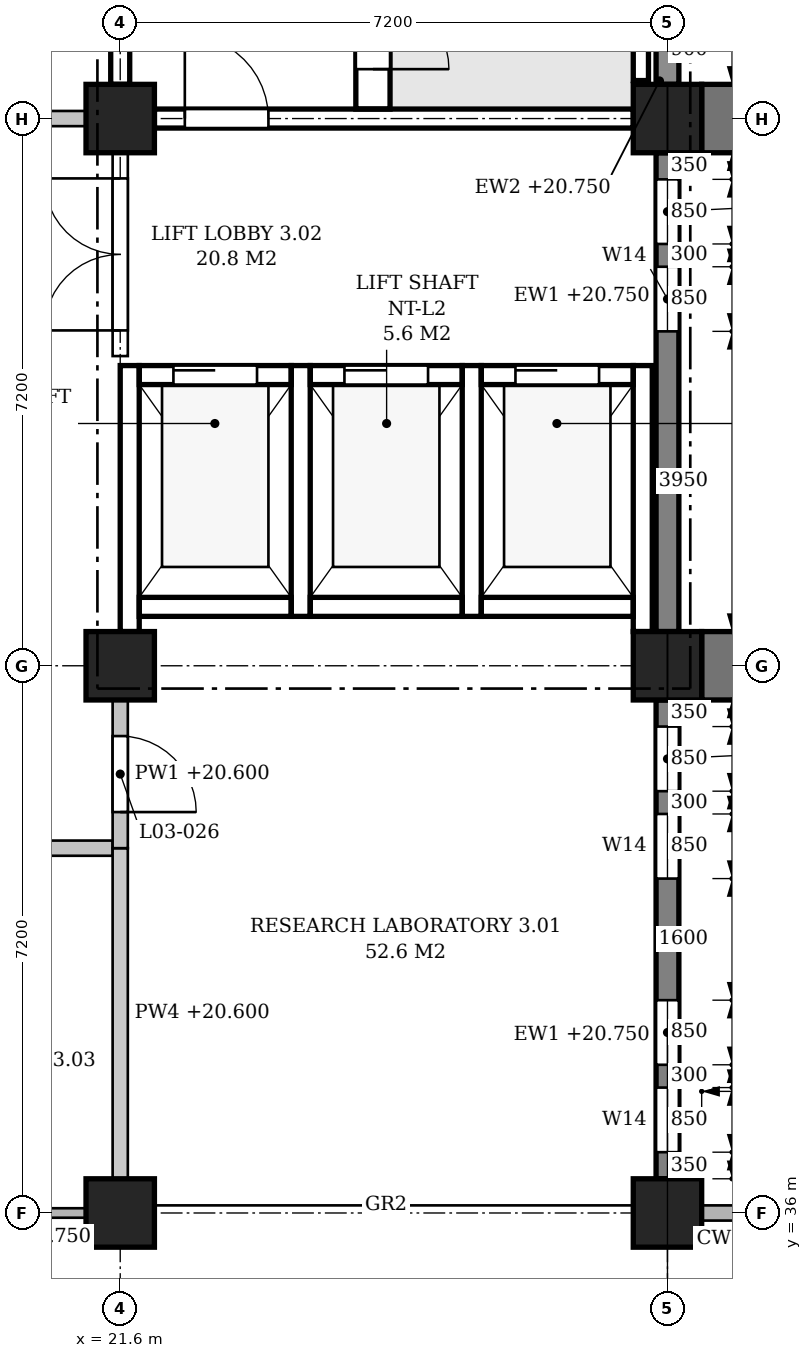
"""IFC4 building model, lengths in metres.
Left out: names, types, materials, properties, quantities, classifications, styles, units other than length and angle.
Written with IfcOpenShell. Run it as: python <this file> out.ifc"""

import sys

from ifc_helpers import new_model, si_unit, direction, frame, frame_2d, origin, origin_2d, place, context, subcontext, project, spatial, polyline, rectangle, outline, extrude, element, fill, save


model = new_model("IFC4")
c1 = context("Model", 3, precision=1e-05, world=origin(), true_north=direction((0.0, 1.0)))
c2 = subcontext(c1, "Body", "Model", "MODEL_VIEW")
j1 = project(units=[si_unit("LENGTHUNIT", "METRE"), si_unit("PLANEANGLEUNIT", "RADIAN")], contexts=[c1])
p1 = place(None, origin())
s1 = spatial("IfcSite", under=j1, at=p1, CompositionType="ELEMENT")
p2 = place(p1, origin())
s2 = spatial("IfcBuilding", under=s1, at=p2, CompositionType="ELEMENT")
p3 = place(p2, frame((0.0, 0.0, 16.8)))
s3 = spatial("IfcBuildingStorey", under=s2, at=p3, CompositionType="ELEMENT", Elevation=16.8)
for number, where, z_axis, x_axis in (
    (1, (21.6, 36.0, 0.0), (0.0, 0.0, 1.0), (1.0, 0.0, 0.0)),
    (2, (21.6, 43.2, 0.0), (0.0, 0.0, 1.0), (1.0, 0.0, 0.0)),
    (3, (21.6, 50.4, 0.0), (0.0, 0.0, 1.0), (1.0, 0.0, 0.0)),
    (4, (28.8, 36.0, 0.0), (0.0, 0.0, 1.0), (1.0, 0.0, 0.0)),
    (5, (28.8, 43.2, 0.0), (0.0, 0.0, 1.0), (1.0, 0.0, 0.0)),
    (6, (28.8, 50.4, 0.0), (0.0, 0.0, 1.0), (1.0, 0.0, 0.0)),
):
    element("IfcColumn", number, at=place(p3, frame(where, z_axis=z_axis, x_axis=x_axis)), inside=s3, PredefinedType="COLUMN", context=c2, shape_type="SweptSolid", body=[
        extrude(rectangle(XDim=0.9, YDim=0.9, at=origin_2d()), origin(), (0.0, 0.0, 1.0), 4.8),
    ])
p4 = place(p3, frame((28.8, 36.45, 0.0), z_axis=(0.0, 0.0, 1.0), x_axis=(0.0, 1.0, 0.0)))
e7 = element("IfcWall", 7, at=p4, inside=s3, PredefinedType="STANDARD", context=c2, shape_type="SweptSolid", body=[
    extrude(rectangle(XDim=6.3, YDim=0.3, at=frame_2d((3.15, 0.0))), origin(), (0.0, 0.0, 1.0), 3.95),
])
p5 = place(p4, frame((0.35, 0.0, 0.9)))
e8 = element("IfcOpeningElement", 8, at=p5, cuts=e7, PredefinedType="OPENING", context=c2, shape_type="SweptSolid", body=[
    extrude(outline(polyline([(0.0, 0.0), (0.85, 0.0), (0.85, 2.05), (0.425, 2.5), (0.0, 2.05), (0.0, 0.0)])), frame((0.0, 0.16, 0.0), z_axis=(0.0, -1.0, 0.0), x_axis=(1.0, 0.0, 0.0)), (0.0, 0.0, 1.0), 0.32),
])
p6 = place(p4, frame((1.5, 0.0, 0.9)))
e9 = element("IfcOpeningElement", 9, at=p6, cuts=e7, PredefinedType="OPENING", context=c2, shape_type="SweptSolid", body=[
    extrude(outline(polyline([(0.0, 0.0), (0.85, 0.0), (0.85, 2.05), (0.425, 2.5), (0.0, 2.05), (0.0, 0.0)])), frame((0.0, 0.16, 0.0), z_axis=(0.0, -1.0, 0.0), x_axis=(1.0, 0.0, 0.0)), (0.0, 0.0, 1.0), 0.32),
])
p7 = place(p4, frame((3.95, 0.0, 0.9)))
e10 = element("IfcOpeningElement", 10, at=p7, cuts=e7, PredefinedType="OPENING", context=c2, shape_type="SweptSolid", body=[
    extrude(outline(polyline([(0.0, 0.0), (0.85, 0.0), (0.85, 2.05), (0.425, 2.5), (0.0, 2.05), (0.0, 0.0)])), frame((0.0, 0.16, 0.0), z_axis=(0.0, -1.0, 0.0), x_axis=(1.0, 0.0, 0.0)), (0.0, 0.0, 1.0), 0.32),
])
p8 = place(p4, frame((5.1, 0.0, 0.9)))
e11 = element("IfcOpeningElement", 11, at=p8, cuts=e7, PredefinedType="OPENING", context=c2, shape_type="SweptSolid", body=[
    extrude(outline(polyline([(0.0, 0.0), (0.85, 0.0), (0.85, 2.05), (0.425, 2.5), (0.0, 2.05), (0.0, 0.0)])), frame((0.0, 0.16, 0.0), z_axis=(0.0, -1.0, 0.0), x_axis=(1.0, 0.0, 0.0)), (0.0, 0.0, 1.0), 0.32),
])
p9 = place(p3, frame((28.8, 43.65, 0.0), z_axis=(0.0, 0.0, 1.0), x_axis=(0.0, 1.0, 0.0)))
e12 = element("IfcWall", 12, at=p9, inside=s3, PredefinedType="STANDARD", context=c2, shape_type="SweptSolid", body=[
    extrude(rectangle(XDim=6.3, YDim=0.3, at=frame_2d((3.15, 0.0))), origin(), (0.0, 0.0, 1.0), 3.95),
])
p10 = place(p9, frame((3.95, 0.0, 0.9)))
e13 = element("IfcOpeningElement", 13, at=p10, cuts=e12, PredefinedType="OPENING", context=c2, shape_type="SweptSolid", body=[
    extrude(outline(polyline([(0.0, 0.0), (0.85, 0.0), (0.85, 2.05), (0.425, 2.5), (0.0, 2.05), (0.0, 0.0)])), frame((0.0, 0.16, 0.0), z_axis=(0.0, -1.0, 0.0), x_axis=(1.0, 0.0, 0.0)), (0.0, 0.0, 1.0), 0.32),
])
p11 = place(p9, frame((5.1, 0.0, 0.9)))
e14 = element("IfcOpeningElement", 14, at=p11, cuts=e12, PredefinedType="OPENING", context=c2, shape_type="SweptSolid", body=[
    extrude(outline(polyline([(0.0, 0.0), (0.85, 0.0), (0.85, 2.05), (0.425, 2.5), (0.0, 2.05), (0.0, 0.0)])), frame((0.0, 0.16, 0.0), z_axis=(0.0, -1.0, 0.0), x_axis=(1.0, 0.0, 0.0)), (0.0, 0.0, 1.0), 0.32),
])
p12 = place(p3, frame((28.8, 50.85, 0.0), z_axis=(0.0, 0.0, 1.0), x_axis=(0.0, 1.0, 0.0)))
e15 = element("IfcWall", 15, at=p12, inside=s3, PredefinedType="STANDARD", context=c2, shape_type="SweptSolid", body=[
    extrude(rectangle(XDim=6.3, YDim=0.3, at=frame_2d((3.15, 0.0))), origin(), (0.0, 0.0, 1.0), 3.95),
])
p13 = place(p12, frame((0.9, 0.0, 0.9)))
e16 = element("IfcOpeningElement", 16, at=p13, cuts=e15, PredefinedType="OPENING", context=c2, shape_type="SweptSolid", body=[
    extrude(outline(polyline([(0.0, 0.0), (0.9, 0.0), (0.9, 2.05), (0.45, 2.5), (0.0, 2.05), (0.0, 0.0)])), frame((0.0, 0.16, 0.0), z_axis=(0.0, -1.0, 0.0), x_axis=(1.0, 0.0, 0.0)), (0.0, 0.0, 1.0), 0.32),
])
p14 = place(p12, frame((4.5, 0.0, 0.9)))
e17 = element("IfcOpeningElement", 17, at=p14, cuts=e15, PredefinedType="OPENING", context=c2, shape_type="SweptSolid", body=[
    extrude(outline(polyline([(0.0, 0.0), (0.9, 0.0), (0.9, 2.05), (0.45, 2.5), (0.0, 2.05), (0.0, 0.0)])), frame((0.0, 0.16, 0.0), z_axis=(0.0, -1.0, 0.0), x_axis=(1.0, 0.0, 0.0)), (0.0, 0.0, 1.0), 0.32),
])
for number, where, z_axis, x_axis in (
    (18, (29.25, 43.2, 0.0), (0.0, 0.0, 1.0), (1.0, 0.0, 0.0)),
    (19, (29.25, 50.4, 0.0), (0.0, 0.0, 1.0), (1.0, 0.0, 0.0)),
):
    element("IfcWall", number, at=place(p3, frame(where, z_axis=z_axis, x_axis=x_axis)), inside=s3, PredefinedType="POLYGONAL", context=c2, shape_type="SweptSolid", body=[
        extrude(outline(polyline([(1.1, 0.0), (1.1, 4.55), (0.0, 4.55), (0.0, 0.0), (1.1, 0.0)])), frame((0.0, 0.45, 0.0), z_axis=(0.0, -1.0, 0.0), x_axis=(1.0, 0.0, 0.0)), (0.0, 0.0, 1.0), 0.9),
    ])
p15 = place(p3, frame((22.05, 50.4, 0.0), z_axis=(0.0, 0.0, 1.0), x_axis=(1.0, 0.0, 0.0)))
e20 = element("IfcWall", 20, at=p15, inside=s3, PredefinedType="SHEAR", context=c2, shape_type="SweptSolid", body=[
    extrude(rectangle(XDim=6.3, YDim=0.25, at=frame_2d((3.15, 0.0))), origin(), (0.0, 0.0, 1.0), 3.8),
])
p16 = place(p15, frame((0.4, 0.0, 0.0)))
e21 = element("IfcOpeningElement", 21, at=p16, cuts=e20, PredefinedType="OPENING", context=c2, shape_type="SweptSolid", body=[
    extrude(rectangle(XDim=1.1, YDim=2.1, at=frame_2d((0.55, 1.05))), frame((0.0, 0.135, 0.0), z_axis=(0.0, -1.0, 0.0), x_axis=(1.0, 0.0, 0.0)), (0.0, 0.0, 1.0), 0.27),
])
p17 = place(p3, frame((21.6, 50.85, 0.0), z_axis=(0.0, 0.0, 1.0), x_axis=(0.0, 1.0, 0.0)))
e22 = element("IfcWall", 22, at=p17, inside=s3, PredefinedType="SHEAR", context=c2, shape_type="SweptSolid", body=[
    extrude(rectangle(XDim=6.3, YDim=0.25, at=frame_2d((3.15, 0.0))), origin(), (0.0, 0.0, 1.0), 3.8),
])
p18 = place(p3, frame((28.45, 50.9, -0.25), z_axis=(0.0, 0.0, 1.0), x_axis=(0.0, 1.0, 0.0)))
e23 = element("IfcWall", 23, at=p18, inside=s3, PredefinedType="SHEAR", context=c2, shape_type="SweptSolid", body=[
    extrude(rectangle(XDim=0.85, YDim=0.2, at=frame_2d((0.425, 0.0))), origin(), (0.0, 0.0, 1.0), 4.8),
])
p19 = place(p3, frame((24.925, 50.525, 0.0), z_axis=(0.0, 0.0, 1.0), x_axis=(0.0, 1.0, 0.0)))
e24 = element("IfcWall", 24, at=p19, inside=s3, PredefinedType="SHEAR", context=c2, shape_type="SweptSolid", body=[
    extrude(rectangle(XDim=6.85, YDim=0.45, at=frame_2d((3.425, 0.0))), origin(), (0.0, 0.0, 1.0), 4.55),
])
p20 = place(p19, frame((0.525, 0.0, 0.0)))
e25 = element("IfcOpeningElement", 25, at=p20, cuts=e24, PredefinedType="OPENING", context=c2, shape_type="SweptSolid", body=[
    extrude(rectangle(XDim=1.0, YDim=2.1, at=frame_2d((0.5, 1.05))), frame((0.0, 0.235, 0.0), z_axis=(0.0, -1.0, 0.0), x_axis=(1.0, 0.0, 0.0)), (0.0, 0.0, 1.0), 0.47),
])
p21 = place(p3, frame((21.725, 43.65, -0.25), z_axis=(0.0, 0.0, 1.0), x_axis=(0.0, 1.0, 0.0)))
e26 = element("IfcWall", 26, at=p21, inside=s3, PredefinedType="SHEAR", context=c2, shape_type="SweptSolid", body=[
    extrude(rectangle(XDim=3.5, YDim=0.25, at=frame_2d((1.75, 0.0))), origin(), (0.0, 0.0, 1.0), 4.05),
])
for number, where, z_axis, x_axis in (
    (27, (23.975, 43.85, -0.25), (0.0, 0.0, 1.0), (0.0, 1.0, 0.0)),
    (28, (26.225, 43.85, -0.25), (0.0, 0.0, 1.0), (0.0, 1.0, 0.0)),
):
    element("IfcWall", number, at=place(p3, frame(where, z_axis=z_axis, x_axis=x_axis)), inside=s3, PredefinedType="SHEAR", context=c2, shape_type="SweptSolid", body=[
        extrude(rectangle(XDim=3.3, YDim=0.25, at=frame_2d((1.65, 0.0))), origin(), (0.0, 0.0, 1.0), 4.8),
    ])
p22 = place(p3, frame((28.475, 43.65, -0.25), z_axis=(0.0, 0.0, 1.0), x_axis=(0.0, 1.0, 0.0)))
e29 = element("IfcWall", 29, at=p22, inside=s3, PredefinedType="SHEAR", context=c2, shape_type="SweptSolid", body=[
    extrude(rectangle(XDim=3.5, YDim=0.25, at=frame_2d((1.75, 0.0))), origin(), (0.0, 0.0, 1.0), 4.8),
])
p23 = place(p3, frame((21.85, 47.025, -0.25), z_axis=(0.0, 0.0, 1.0), x_axis=(1.0, 0.0, 0.0)))
e30 = element("IfcWall", 30, at=p23, inside=s3, PredefinedType="SHEAR", context=c2, shape_type="SweptSolid", body=[
    extrude(rectangle(XDim=2.0, YDim=0.25, at=frame_2d((1.0, 0.0))), origin(), (0.0, 0.0, 1.0), 4.8),
])
p24 = place(p23, frame((0.45, 0.0, 0.25)))
e31 = element("IfcOpeningElement", 31, at=p24, cuts=e30, PredefinedType="OPENING", context=c2, shape_type="SweptSolid", body=[
    extrude(rectangle(XDim=1.1, YDim=2.1, at=frame_2d((0.55, 1.05))), frame((0.0, 0.135, 0.0), z_axis=(0.0, -1.0, 0.0), x_axis=(1.0, 0.0, 0.0)), (0.0, 0.0, 1.0), 0.27),
])
p25 = place(p3, frame((21.85, 43.975, -0.25), z_axis=(0.0, 0.0, 1.0), x_axis=(1.0, 0.0, 0.0)))
e32 = element("IfcWall", 32, at=p25, inside=s3, PredefinedType="SHEAR", context=c2, shape_type="SweptSolid", body=[
    extrude(rectangle(XDim=2.0, YDim=0.25, at=frame_2d((1.0, 0.0))), origin(), (0.0, 0.0, 1.0), 4.8),
])
p26 = place(p3, frame((24.1, 47.025, -0.25), z_axis=(0.0, 0.0, 1.0), x_axis=(1.0, 0.0, 0.0)))
e33 = element("IfcWall", 33, at=p26, inside=s3, PredefinedType="SHEAR", context=c2, shape_type="SweptSolid", body=[
    extrude(rectangle(XDim=2.0, YDim=0.25, at=frame_2d((1.0, 0.0))), origin(), (0.0, 0.0, 1.0), 4.8),
])
p27 = place(p26, frame((0.45, 0.0, 0.25)))
e34 = element("IfcOpeningElement", 34, at=p27, cuts=e33, PredefinedType="OPENING", context=c2, shape_type="SweptSolid", body=[
    extrude(rectangle(XDim=1.1, YDim=2.1, at=frame_2d((0.55, 1.05))), frame((0.0, 0.135, 0.0), z_axis=(0.0, -1.0, 0.0), x_axis=(1.0, 0.0, 0.0)), (0.0, 0.0, 1.0), 0.27),
])
p28 = place(p3, frame((24.1, 43.975, -0.25), z_axis=(0.0, 0.0, 1.0), x_axis=(1.0, 0.0, 0.0)))
e35 = element("IfcWall", 35, at=p28, inside=s3, PredefinedType="SHEAR", context=c2, shape_type="SweptSolid", body=[
    extrude(rectangle(XDim=2.0, YDim=0.25, at=frame_2d((1.0, 0.0))), origin(), (0.0, 0.0, 1.0), 4.8),
])
p29 = place(p3, frame((26.35, 47.025, -0.25), z_axis=(0.0, 0.0, 1.0), x_axis=(1.0, 0.0, 0.0)))
e36 = element("IfcWall", 36, at=p29, inside=s3, PredefinedType="SHEAR", context=c2, shape_type="SweptSolid", body=[
    extrude(rectangle(XDim=2.0, YDim=0.25, at=frame_2d((1.0, 0.0))), origin(), (0.0, 0.0, 1.0), 4.8),
])
p30 = place(p29, frame((0.45, 0.0, 0.25)))
e37 = element("IfcOpeningElement", 37, at=p30, cuts=e36, PredefinedType="OPENING", context=c2, shape_type="SweptSolid", body=[
    extrude(rectangle(XDim=1.1, YDim=2.1, at=frame_2d((0.55, 1.05))), frame((0.0, 0.135, 0.0), z_axis=(0.0, -1.0, 0.0), x_axis=(1.0, 0.0, 0.0)), (0.0, 0.0, 1.0), 0.27),
])
p31 = place(p3, frame((26.35, 43.975, -0.25), z_axis=(0.0, 0.0, 1.0), x_axis=(1.0, 0.0, 0.0)))
e38 = element("IfcWall", 38, at=p31, inside=s3, PredefinedType="SHEAR", context=c2, shape_type="SweptSolid", body=[
    extrude(rectangle(XDim=2.0, YDim=0.25, at=frame_2d((1.0, 0.0))), origin(), (0.0, 0.0, 1.0), 4.8),
])
p32 = place(p3, frame((18.1, 40.8, 0.0), z_axis=(0.0, 0.0, 1.0), x_axis=(1.0, 0.0, 0.0)))
e39 = element("IfcWall", 39, at=p32, inside=s3, PredefinedType="PARTITIONING", context=c2, shape_type="SweptSolid", body=[
    extrude(outline(polyline([(0.0, 0.0), (3.4, 0.0), (3.4, 3.8), (3.25, 3.8), (3.25, 4.55), (0.0, 4.55), (0.0, 0.0)])), frame((0.0, 0.1, 0.0), z_axis=(0.0, -1.0, 0.0), x_axis=(1.0, 0.0, 0.0)), (0.0, 0.0, 1.0), 0.2),
])
p33 = place(p32, frame((1.2, 0.0, 0.0)))
e40 = element("IfcOpeningElement", 40, at=p33, cuts=e39, PredefinedType="OPENING", context=c2, shape_type="SweptSolid", body=[
    extrude(rectangle(XDim=1.0, YDim=2.1, at=frame_2d((0.5, 1.05))), frame((0.0, 0.11, 0.0), z_axis=(0.0, -1.0, 0.0), x_axis=(1.0, 0.0, 0.0)), (0.0, 0.0, 1.0), 0.22),
])
p34 = place(p3, frame((14.85, 50.4, 0.0), z_axis=(0.0, 0.0, 1.0), x_axis=(1.0, 0.0, 0.0)))
e41 = element("IfcWall", 41, at=p34, inside=s3, PredefinedType="PARTITIONING", context=c2, shape_type="SweptSolid", body=[
    extrude(rectangle(XDim=6.3, YDim=0.2, at=frame_2d((3.15, 0.0))), origin(), (0.0, 0.0, 1.0), 3.8),
])
p35 = place(p34, frame((4.225, 0.0, 0.0)))
e42 = element("IfcOpeningElement", 42, at=p35, cuts=e41, PredefinedType="OPENING", context=c2, shape_type="SweptSolid", body=[
    extrude(rectangle(XDim=1.0, YDim=2.1, at=frame_2d((0.5, 1.05))), frame((0.0, 0.11, 0.0), z_axis=(0.0, -1.0, 0.0), x_axis=(1.0, 0.0, 0.0)), (0.0, 0.0, 1.0), 0.22),
])
p36 = place(p3, frame((21.6, 36.45, 0.0), z_axis=(0.0, 0.0, 1.0), x_axis=(0.0, 1.0, 0.0)))
e43 = element("IfcWall", 43, at=p36, inside=s3, PredefinedType="PARTITIONING", context=c2, shape_type="SweptSolid", body=[
    extrude(rectangle(XDim=4.35, YDim=0.2, at=frame_2d((2.175, 0.0))), origin(), (0.0, 0.0, 1.0), 3.8),
])
p37 = place(p3, frame((21.6, 40.8, 0.0), z_axis=(0.0, 0.0, 1.0), x_axis=(0.0, 1.0, 0.0)))
e44 = element("IfcWall", 44, at=p37, inside=s3, PredefinedType="PARTITIONING", context=c2, shape_type="SweptSolid", body=[
    extrude(rectangle(XDim=1.95, YDim=0.2, at=frame_2d((0.975, 0.0))), origin(), (0.0, 0.0, 1.0), 3.8),
])
p38 = place(p37, frame((0.475, 0.0, 0.0)))
e45 = element("IfcOpeningElement", 45, at=p38, cuts=e44, PredefinedType="OPENING", context=c2, shape_type="SweptSolid", body=[
    extrude(rectangle(XDim=1.0, YDim=2.1, at=frame_2d((0.5, 1.05))), frame((0.0, 0.11, 0.0), z_axis=(0.0, -1.0, 0.0), x_axis=(1.0, 0.0, 0.0)), (0.0, 0.0, 1.0), 0.22),
])
p39 = place(p3, frame((21.6, 47.275, 0.0), z_axis=(0.0, 0.0, 1.0), x_axis=(0.0, 1.0, 0.0)))
e46 = element("IfcWall", 46, at=p39, inside=s3, PredefinedType="PARTITIONING", context=c2, shape_type="SweptSolid", body=[
    extrude(rectangle(XDim=2.675, YDim=0.2, at=frame_2d((1.337, 0.0))), origin(), (0.0, 0.0, 1.0), 3.8),
])
p40 = place(p39, frame((0.337, 0.0, 0.0)))
e47 = element("IfcOpeningElement", 47, at=p40, cuts=e46, PredefinedType="OPENING", context=c2, shape_type="SweptSolid", body=[
    extrude(rectangle(XDim=2.0, YDim=2.4, at=frame_2d((1.0, 1.2))), frame((0.0, 0.11, 0.0), z_axis=(0.0, -1.0, 0.0), x_axis=(1.0, 0.0, 0.0)), (0.0, 0.0, 1.0), 0.22),
])
p41 = place(p5, origin())
e48 = element("IfcWindow", 48, at=p41, inside=s3, PartitioningType="SINGLE_PANEL", PredefinedType="WINDOW", context=c2, shape_type="SweptSolid", body=[
    extrude(outline(polyline([(0.0, 0.0), (0.85, 0.0), (0.85, 2.05), (0.425, 2.5), (0.0, 2.05), (0.0, 0.0)])), frame((0.0, 0.03, 0.0), z_axis=(0.0, -1.0, 0.0), x_axis=(1.0, 0.0, 0.0)), (0.0, 0.0, 1.0), 0.06),
])
fill(e8, e48)
p42 = place(p6, origin())
e49 = element("IfcWindow", 49, at=p42, inside=s3, PartitioningType="SINGLE_PANEL", PredefinedType="WINDOW", context=c2, shape_type="SweptSolid", body=[
    extrude(outline(polyline([(0.0, 0.0), (0.85, 0.0), (0.85, 2.05), (0.425, 2.5), (0.0, 2.05), (0.0, 0.0)])), frame((0.0, 0.03, 0.0), z_axis=(0.0, -1.0, 0.0), x_axis=(1.0, 0.0, 0.0)), (0.0, 0.0, 1.0), 0.06),
])
fill(e9, e49)
p43 = place(p7, origin())
e50 = element("IfcWindow", 50, at=p43, inside=s3, PartitioningType="SINGLE_PANEL", PredefinedType="WINDOW", context=c2, shape_type="SweptSolid", body=[
    extrude(outline(polyline([(0.0, 0.0), (0.85, 0.0), (0.85, 2.05), (0.425, 2.5), (0.0, 2.05), (0.0, 0.0)])), frame((0.0, 0.03, 0.0), z_axis=(0.0, -1.0, 0.0), x_axis=(1.0, 0.0, 0.0)), (0.0, 0.0, 1.0), 0.06),
])
fill(e10, e50)
p44 = place(p8, origin())
e51 = element("IfcWindow", 51, at=p44, inside=s3, PartitioningType="SINGLE_PANEL", PredefinedType="WINDOW", context=c2, shape_type="SweptSolid", body=[
    extrude(outline(polyline([(0.0, 0.0), (0.85, 0.0), (0.85, 2.05), (0.425, 2.5), (0.0, 2.05), (0.0, 0.0)])), frame((0.0, 0.03, 0.0), z_axis=(0.0, -1.0, 0.0), x_axis=(1.0, 0.0, 0.0)), (0.0, 0.0, 1.0), 0.06),
])
fill(e11, e51)
p45 = place(p10, origin())
e52 = element("IfcWindow", 52, at=p45, inside=s3, PartitioningType="SINGLE_PANEL", PredefinedType="WINDOW", context=c2, shape_type="SweptSolid", body=[
    extrude(outline(polyline([(0.0, 0.0), (0.85, 0.0), (0.85, 2.05), (0.425, 2.5), (0.0, 2.05), (0.0, 0.0)])), frame((0.0, 0.03, 0.0), z_axis=(0.0, -1.0, 0.0), x_axis=(1.0, 0.0, 0.0)), (0.0, 0.0, 1.0), 0.06),
])
fill(e13, e52)
p46 = place(p11, origin())
e53 = element("IfcWindow", 53, at=p46, inside=s3, PartitioningType="SINGLE_PANEL", PredefinedType="WINDOW", context=c2, shape_type="SweptSolid", body=[
    extrude(outline(polyline([(0.0, 0.0), (0.85, 0.0), (0.85, 2.05), (0.425, 2.5), (0.0, 2.05), (0.0, 0.0)])), frame((0.0, 0.03, 0.0), z_axis=(0.0, -1.0, 0.0), x_axis=(1.0, 0.0, 0.0)), (0.0, 0.0, 1.0), 0.06),
])
fill(e14, e53)
p47 = place(p20, frame((1.0, 0.0, 0.0), z_axis=(0.0, 0.0, 1.0), x_axis=(-1.0, 0.0, 0.0)))
e54 = element("IfcDoor", 54, at=p47, inside=s3, OperationType="SINGLE_SWING_RIGHT", PredefinedType="DOOR", context=c2, shape_type="SweptSolid", body=[
    extrude(rectangle(XDim=1.0, YDim=2.1, at=frame_2d((0.5, 1.05))), frame((0.0, 0.025, 0.0), z_axis=(0.0, -1.0, 0.0), x_axis=(1.0, 0.0, 0.0)), (0.0, 0.0, 1.0), 0.05),
])
fill(e25, e54)
p48 = place(p16, origin())
e55 = element("IfcDoor", 55, at=p48, inside=s3, OperationType="SINGLE_SWING_LEFT", PredefinedType="DOOR", context=c2, shape_type="SweptSolid", body=[
    extrude(rectangle(XDim=1.1, YDim=2.1, at=frame_2d((0.55, 1.05))), frame((0.0, 0.025, 0.0), z_axis=(0.0, -1.0, 0.0), x_axis=(1.0, 0.0, 0.0)), (0.0, 0.0, 1.0), 0.05),
])
fill(e21, e55)
p49 = place(p24, origin())
e56 = element("IfcDoor", 56, at=p49, inside=s3, OperationType="SLIDING_TO_LEFT", PredefinedType="DOOR", context=c2, shape_type="SweptSolid", body=[
    extrude(rectangle(XDim=1.1, YDim=2.1, at=frame_2d((0.55, 1.05))), frame((0.0, 0.025, 0.0), z_axis=(0.0, -1.0, 0.0), x_axis=(1.0, 0.0, 0.0)), (0.0, 0.0, 1.0), 0.05),
])
fill(e31, e56)
p50 = place(p27, origin())
e57 = element("IfcDoor", 57, at=p50, inside=s3, OperationType="SLIDING_TO_LEFT", PredefinedType="DOOR", context=c2, shape_type="SweptSolid", body=[
    extrude(rectangle(XDim=1.1, YDim=2.1, at=frame_2d((0.55, 1.05))), frame((0.0, 0.025, 0.0), z_axis=(0.0, -1.0, 0.0), x_axis=(1.0, 0.0, 0.0)), (0.0, 0.0, 1.0), 0.05),
])
fill(e34, e57)
p51 = place(p30, origin())
e58 = element("IfcDoor", 58, at=p51, inside=s3, OperationType="SLIDING_TO_LEFT", PredefinedType="DOOR", context=c2, shape_type="SweptSolid", body=[
    extrude(rectangle(XDim=1.1, YDim=2.1, at=frame_2d((0.55, 1.05))), frame((0.0, 0.025, 0.0), z_axis=(0.0, -1.0, 0.0), x_axis=(1.0, 0.0, 0.0)), (0.0, 0.0, 1.0), 0.05),
])
fill(e37, e58)
p52 = place(p40, origin())
e59 = element("IfcDoor", 59, at=p52, inside=s3, OperationType="DOUBLE_DOOR_SINGLE_SWING", PredefinedType="DOOR", context=c2, shape_type="SweptSolid", body=[
    extrude(rectangle(XDim=2.0, YDim=2.4, at=frame_2d((1.0, 1.2))), frame((0.0, 0.025, 0.0), z_axis=(0.0, -1.0, 0.0), x_axis=(1.0, 0.0, 0.0)), (0.0, 0.0, 1.0), 0.05),
])
fill(e47, e59)
p53 = place(p38, frame((1.0, 0.0, 0.0), z_axis=(0.0, 0.0, 1.0), x_axis=(-1.0, 0.0, 0.0)))
e60 = element("IfcDoor", 60, at=p53, inside=s3, OperationType="SINGLE_SWING_RIGHT", PredefinedType="DOOR", context=c2, shape_type="SweptSolid", body=[
    extrude(rectangle(XDim=1.0, YDim=2.1, at=frame_2d((0.5, 1.05))), frame((0.0, 0.025, 0.0), z_axis=(0.0, -1.0, 0.0), x_axis=(1.0, 0.0, 0.0)), (0.0, 0.0, 1.0), 0.05),
])
fill(e45, e60)
save(model, sys.argv[1])
